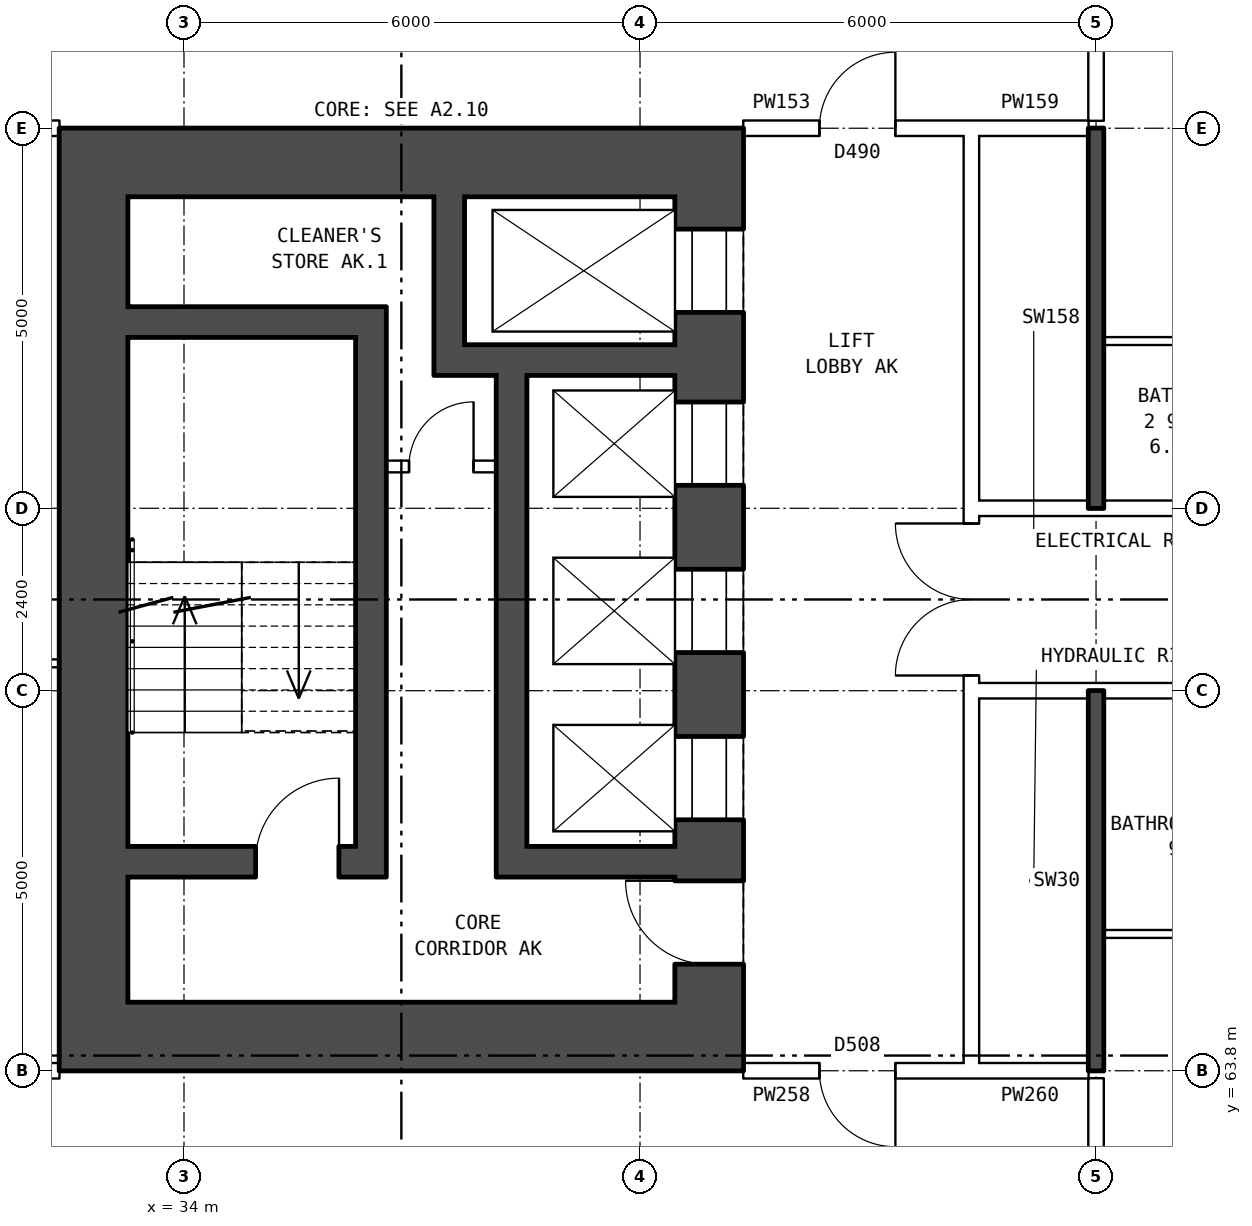
"""IFC4 building model, lengths in metres.
Left out: names, types, materials, properties, quantities, classifications, styles, units other than length and angle.
Written with IfcOpenShell. Run it as: python <this file> out.ifc"""

import sys

from ifc_helpers import new_model, si_unit, direction, frame, frame_2d, origin, place, context, subcontext, project, spatial, rectangle, extrude, element, fill, save


model = new_model("IFC4")
c1 = context("Model", 3, precision=1e-05, world=origin(), true_north=direction((0.0, 1.0)))
c2 = subcontext(c1, "Body", "Model", "MODEL_VIEW")
j1 = project(units=[si_unit("LENGTHUNIT", "METRE"), si_unit("PLANEANGLEUNIT", "RADIAN")], contexts=[c1])
p1 = place(None, origin())
s1 = spatial("IfcSite", under=j1, at=p1, CompositionType="ELEMENT")
p2 = place(p1, origin())
s2 = spatial("IfcBuilding", under=s1, at=p2, CompositionType="ELEMENT")
p3 = place(p2, frame((0.0, 0.0, 35.0)))
s3 = spatial("IfcBuildingStorey", under=s2, at=p3, CompositionType="ELEMENT", Elevation=35.0)
p4 = place(p3, frame((40.91, 75.3, 0.0), z_axis=(0.0, 0.0, 1.0), x_axis=(0.0, -1.0, 0.0)))
e1 = element("IfcWall", 1, at=p4, inside=s3, PredefinedType="SHEAR", context=c2, shape_type="SweptSolid", body=[
    extrude(rectangle(XDim=10.6, YDim=0.9, at=frame_2d((5.3, 0.0))), origin(), (0.0, 0.0, 1.0), 2.85),
])
p5 = place(p4, frame((0.425, 0.0, 0.0)))
e2 = element("IfcOpeningElement", 2, at=p5, cuts=e1, PredefinedType="OPENING", context=c2, shape_type="SweptSolid", body=[
    extrude(rectangle(XDim=1.1, YDim=2.1, at=frame_2d((0.55, 1.05))), frame((0.0, 0.46, 0.0), z_axis=(0.0, -1.0, 0.0), x_axis=(1.0, 0.0, 0.0)), (0.0, 0.0, 1.0), 0.92),
])
p6 = place(p4, frame((2.7, 0.0, 0.0)))
e3 = element("IfcOpeningElement", 3, at=p6, cuts=e1, PredefinedType="OPENING", context=c2, shape_type="SweptSolid", body=[
    extrude(rectangle(XDim=1.1, YDim=2.1, at=frame_2d((0.55, 1.05))), frame((0.0, 0.46, 0.0), z_axis=(0.0, -1.0, 0.0), x_axis=(1.0, 0.0, 0.0)), (0.0, 0.0, 1.0), 0.92),
])
p7 = place(p4, frame((4.9, 0.0, 0.0)))
e4 = element("IfcOpeningElement", 4, at=p7, cuts=e1, PredefinedType="OPENING", context=c2, shape_type="SweptSolid", body=[
    extrude(rectangle(XDim=1.1, YDim=2.1, at=frame_2d((0.55, 1.05))), frame((0.0, 0.46, 0.0), z_axis=(0.0, -1.0, 0.0), x_axis=(1.0, 0.0, 0.0)), (0.0, 0.0, 1.0), 0.92),
])
p8 = place(p4, frame((7.1, 0.0, 0.0)))
e5 = element("IfcOpeningElement", 5, at=p8, cuts=e1, PredefinedType="OPENING", context=c2, shape_type="SweptSolid", body=[
    extrude(rectangle(XDim=1.1, YDim=2.1, at=frame_2d((0.55, 1.05))), frame((0.0, 0.46, 0.0), z_axis=(0.0, -1.0, 0.0), x_axis=(1.0, 0.0, 0.0)), (0.0, 0.0, 1.0), 0.92),
])
p9 = place(p4, frame((9.0, 0.0, 0.0)))
e6 = element("IfcOpeningElement", 6, at=p9, cuts=e1, PredefinedType="OPENING", context=c2, shape_type="SweptSolid", body=[
    extrude(rectangle(XDim=1.1, YDim=2.1, at=frame_2d((0.55, 1.05))), frame((0.0, 0.46, 0.0), z_axis=(0.0, -1.0, 0.0), x_axis=(1.0, 0.0, 0.0)), (0.0, 0.0, 1.0), 0.92),
])
p10 = place(p3, frame((32.81, 75.3, 0.0), z_axis=(0.0, 0.0, 1.0), x_axis=(0.0, -1.0, 0.0)))
e7 = element("IfcWall", 7, at=p10, inside=s3, PredefinedType="SHEAR", context=c2, shape_type="SweptSolid", body=[
    extrude(rectangle(XDim=10.6, YDim=0.9, at=frame_2d((5.3, 0.0))), origin(), (0.0, 0.0, 1.0), 2.85),
])
for number, where, z_axis, x_axis in (
    (8, (41.36, 75.75, 0.0), (0.0, 0.0, 1.0), (-1.0, 0.0, 0.0)),
    (9, (41.36, 64.25, 0.0), (0.0, 0.0, 1.0), (-1.0, 0.0, 0.0)),
):
    element("IfcWall", number, at=place(p3, frame(where, z_axis=z_axis, x_axis=x_axis)), inside=s3, PredefinedType="SHEAR", context=c2, shape_type="SweptSolid", body=[
        extrude(rectangle(XDim=9.0, YDim=0.9, at=frame_2d((4.5, 0.0))), origin(), (0.0, 0.0, 1.0), 2.85),
    ])
p11 = place(p3, frame((36.26, 73.65, 0.0), z_axis=(0.0, 0.0, 1.0), x_axis=(-1.0, 0.0, 0.0)))
e10 = element("IfcWall", 10, at=p11, inside=s3, PredefinedType="SHEAR", context=c2, shape_type="SweptSolid", body=[
    extrude(rectangle(XDim=3.0, YDim=0.4, at=frame_2d((1.5, 0.0))), origin(), (0.0, 0.0, 1.0), 2.85),
])
p12 = place(p3, frame((40.46, 73.15, 0.0), z_axis=(0.0, 0.0, 1.0), x_axis=(-1.0, 0.0, 0.0)))
e11 = element("IfcWall", 11, at=p12, inside=s3, PredefinedType="SHEAR", context=c2, shape_type="SweptSolid", body=[
    extrude(rectangle(XDim=3.17, YDim=0.4, at=frame_2d((1.585, 0.0))), origin(), (0.0, 0.0, 1.0), 2.85),
])
p13 = place(p3, frame((38.11, 71.75, 0.0), z_axis=(0.0, 0.0, 1.0), x_axis=(-1.0, 0.0, 0.0)))
e12 = element("IfcWall", 12, at=p13, inside=s3, PredefinedType="PARTITIONING", context=c2, shape_type="SweptSolid", body=[
    extrude(rectangle(XDim=1.45, YDim=0.15, at=frame_2d((0.725, 0.0))), origin(), (0.0, 0.0, 1.0), 2.85),
])
p14 = place(p13, frame((0.3, 0.0, 0.0)))
e13 = element("IfcOpeningElement", 13, at=p14, cuts=e12, PredefinedType="OPENING", context=c2, shape_type="SweptSolid", body=[
    extrude(rectangle(XDim=0.85, YDim=2.1, at=frame_2d((0.425, 1.05))), frame((0.0, 0.085, 0.0), z_axis=(0.0, -1.0, 0.0), x_axis=(1.0, 0.0, 0.0)), (0.0, 0.0, 1.0), 0.17),
])
p15 = place(p3, frame((40.46, 66.55, 0.0), z_axis=(0.0, 0.0, 1.0), x_axis=(-1.0, 0.0, 0.0)))
e14 = element("IfcWall", 14, at=p15, inside=s3, PredefinedType="SHEAR", context=c2, shape_type="SweptSolid", body=[
    extrude(rectangle(XDim=1.95, YDim=0.4, at=frame_2d((0.975, 0.0))), origin(), (0.0, 0.0, 1.0), 2.85),
])
p16 = place(p3, frame((36.26, 66.55, 0.0), z_axis=(0.0, 0.0, 1.0), x_axis=(-1.0, 0.0, 0.0)))
e15 = element("IfcWall", 15, at=p16, inside=s3, PredefinedType="SHEAR", context=c2, shape_type="SweptSolid", body=[
    extrude(rectangle(XDim=3.0, YDim=0.4, at=frame_2d((1.5, 0.0))), origin(), (0.0, 0.0, 1.0), 2.85),
])
p17 = place(p16, frame((0.22, 0.0, 0.0)))
e16 = element("IfcOpeningElement", 16, at=p17, cuts=e15, PredefinedType="OPENING", context=c2, shape_type="SweptSolid", body=[
    extrude(rectangle(XDim=1.1, YDim=2.1, at=frame_2d((0.55, 1.05))), frame((0.0, 0.21, 0.0), z_axis=(0.0, -1.0, 0.0), x_axis=(1.0, 0.0, 0.0)), (0.0, 0.0, 1.0), 0.42),
])
p18 = place(p3, frame((38.31, 72.95, 0.0), z_axis=(0.0, 0.0, 1.0), x_axis=(0.0, -1.0, 0.0)))
e17 = element("IfcWall", 17, at=p18, inside=s3, PredefinedType="SHEAR", context=c2, shape_type="SweptSolid", body=[
    extrude(rectangle(XDim=6.6, YDim=0.4, at=frame_2d((3.3, 0.0))), origin(), (0.0, 0.0, 1.0), 2.85),
])
p19 = place(p3, frame((37.49, 75.3, 0.0), z_axis=(0.0, 0.0, 1.0), x_axis=(0.0, -1.0, 0.0)))
e18 = element("IfcWall", 18, at=p19, inside=s3, PredefinedType="SHEAR", context=c2, shape_type="SweptSolid", body=[
    extrude(rectangle(XDim=1.95, YDim=0.4, at=frame_2d((0.975, 0.0))), origin(), (0.0, 0.0, 1.0), 2.85),
])
p20 = place(p3, frame((36.46, 73.85, 0.0), z_axis=(0.0, 0.0, 1.0), x_axis=(0.0, -1.0, 0.0)))
e19 = element("IfcWall", 19, at=p20, inside=s3, PredefinedType="SHEAR", context=c2, shape_type="SweptSolid", body=[
    extrude(rectangle(XDim=7.5, YDim=0.4, at=frame_2d((3.75, 0.0))), origin(), (0.0, 0.0, 1.0), 2.85),
])
p21 = place(p3, frame((44.36, 63.9, 0.0), z_axis=(0.0, 0.0, 1.0), x_axis=(0.0, 1.0, 0.0)))
e20 = element("IfcWall", 20, at=p21, inside=s3, PredefinedType="PARTITIONING", context=c2, shape_type="SweptSolid", body=[
    extrude(rectangle(XDim=12.2, YDim=0.2, at=frame_2d((6.1, 0.0))), origin(), (0.0, 0.0, 1.0), 2.85),
])
p22 = place(p21, frame((5.1, 0.0, 0.0)))
e21 = element("IfcOpeningElement", 21, at=p22, cuts=e20, PredefinedType="OPENING", context=c2, shape_type="SweptSolid", body=[
    extrude(rectangle(XDim=2.0, YDim=2.1, at=frame_2d((1.0, 1.05))), frame((0.0, 0.11, 0.0), z_axis=(0.0, -1.0, 0.0), x_axis=(1.0, 0.0, 0.0)), (0.0, 0.0, 1.0), 0.22),
])
p23 = place(p3, frame((22.51, 63.8, 0.0), z_axis=(0.0, 0.0, 1.0), x_axis=(1.0, 0.0, 0.0)))
e22 = element("IfcWall", 22, at=p23, inside=s3, PredefinedType="PARTITIONING", context=c2, shape_type="SweptSolid", body=[
    extrude(rectangle(XDim=9.85, YDim=0.2, at=frame_2d((4.925, 0.0))), origin(), (0.0, 0.0, 1.0), 2.85),
])
p24 = place(p23, frame((7.27, 0.0, 0.0)))
e23 = element("IfcOpeningElement", 23, at=p24, cuts=e22, PredefinedType="OPENING", context=c2, shape_type="SweptSolid", body=[
    extrude(rectangle(XDim=0.8, YDim=2.1, at=frame_2d((0.4, 1.05))), frame((0.0, 0.11, 0.0), z_axis=(0.0, -1.0, 0.0), x_axis=(1.0, 0.0, 0.0)), (0.0, 0.0, 1.0), 0.22),
])
p25 = place(p3, frame((41.36, 63.8, 0.0), z_axis=(0.0, 0.0, 1.0), x_axis=(1.0, 0.0, 0.0)))
e24 = element("IfcWall", 24, at=p25, inside=s3, PredefinedType="PARTITIONING", context=c2, shape_type="SweptSolid", body=[
    extrude(rectangle(XDim=3.0, YDim=0.2, at=frame_2d((1.5, 0.0))), origin(), (0.0, 0.0, 1.0), 2.85),
])
p26 = place(p25, frame((1.0, 0.0, 0.0)))
e25 = element("IfcOpeningElement", 25, at=p26, cuts=e24, PredefinedType="OPENING", context=c2, shape_type="SweptSolid", body=[
    extrude(rectangle(XDim=1.0, YDim=2.1, at=frame_2d((0.5, 1.05))), frame((0.0, 0.11, 0.0), z_axis=(0.0, -1.0, 0.0), x_axis=(1.0, 0.0, 0.0)), (0.0, 0.0, 1.0), 0.22),
])
p27 = place(p3, frame((44.36, 63.8, 0.0), z_axis=(0.0, 0.0, 1.0), x_axis=(1.0, 0.0, 0.0)))
e26 = element("IfcWall", 26, at=p27, inside=s3, PredefinedType="PARTITIONING", context=c2, shape_type="SweptSolid", body=[
    extrude(rectangle(XDim=1.54, YDim=0.2, at=frame_2d((0.77, 0.0))), origin(), (0.0, 0.0, 1.0), 2.85),
])
p28 = place(p3, frame((46.1, 65.6, 0.0), z_axis=(0.0, 0.0, 1.0), x_axis=(1.0, 0.0, 0.0)))
e27 = element("IfcWall", 27, at=p28, inside=s3, PredefinedType="PARTITIONING", context=c2, shape_type="SweptSolid", body=[
    extrude(rectangle(XDim=2.9, YDim=0.1, at=frame_2d((1.45, 0.0))), origin(), (0.0, 0.0, 1.0), 2.85),
])
p29 = place(p3, frame((44.36, 68.8, 0.0), z_axis=(0.0, 0.0, 1.0), x_axis=(1.0, 0.0, 0.0)))
e28 = element("IfcWall", 28, at=p29, inside=s3, PredefinedType="PARTITIONING", context=c2, shape_type="SweptSolid", body=[
    extrude(rectangle(XDim=19.28, YDim=0.2, at=frame_2d((9.64, 0.0))), origin(), (0.0, 0.0, 1.0), 2.85),
])
p30 = place(p29, frame((14.64, 0.0, 0.0)))
e29 = element("IfcOpeningElement", 29, at=p30, cuts=e28, PredefinedType="OPENING", context=c2, shape_type="SweptSolid", body=[
    extrude(rectangle(XDim=1.0, YDim=2.1, at=frame_2d((0.5, 1.05))), frame((0.0, 0.11, 0.0), z_axis=(0.0, -1.0, 0.0), x_axis=(1.0, 0.0, 0.0)), (0.0, 0.0, 1.0), 0.22),
])
p31 = place(p29, frame((5.64, 0.0, 0.0)))
e30 = element("IfcOpeningElement", 30, at=p31, cuts=e28, PredefinedType="OPENING", context=c2, shape_type="SweptSolid", body=[
    extrude(rectangle(XDim=1.0, YDim=2.1, at=frame_2d((0.5, 1.05))), frame((0.0, 0.11, 0.0), z_axis=(0.0, -1.0, 0.0), x_axis=(1.0, 0.0, 0.0)), (0.0, 0.0, 1.0), 0.22),
])
p32 = place(p3, frame((28.1, 69.16, 0.0), z_axis=(0.0, 0.0, 1.0), x_axis=(1.0, 0.0, 0.0)))
e31 = element("IfcWall", 31, at=p32, inside=s3, PredefinedType="PARTITIONING", context=c2, shape_type="SweptSolid", body=[
    extrude(rectangle(XDim=4.26, YDim=0.1, at=frame_2d((2.13, 0.0))), origin(), (0.0, 0.0, 1.0), 2.85),
])
p33 = place(p3, frame((44.36, 71.2, 0.0), z_axis=(0.0, 0.0, 1.0), x_axis=(1.0, 0.0, 0.0)))
e32 = element("IfcWall", 32, at=p33, inside=s3, PredefinedType="PARTITIONING", context=c2, shape_type="SweptSolid", body=[
    extrude(rectangle(XDim=19.28, YDim=0.2, at=frame_2d((9.64, 0.0))), origin(), (0.0, 0.0, 1.0), 2.85),
])
p34 = place(p33, frame((14.64, 0.0, 0.0)))
e33 = element("IfcOpeningElement", 33, at=p34, cuts=e32, PredefinedType="OPENING", context=c2, shape_type="SweptSolid", body=[
    extrude(rectangle(XDim=1.0, YDim=2.1, at=frame_2d((0.5, 1.05))), frame((0.0, 0.11, 0.0), z_axis=(0.0, -1.0, 0.0), x_axis=(1.0, 0.0, 0.0)), (0.0, 0.0, 1.0), 0.22),
])
p35 = place(p33, frame((5.64, 0.0, 0.0)))
e34 = element("IfcOpeningElement", 34, at=p35, cuts=e32, PredefinedType="OPENING", context=c2, shape_type="SweptSolid", body=[
    extrude(rectangle(XDim=1.0, YDim=2.1, at=frame_2d((0.5, 1.05))), frame((0.0, 0.11, 0.0), z_axis=(0.0, -1.0, 0.0), x_axis=(1.0, 0.0, 0.0)), (0.0, 0.0, 1.0), 0.22),
])
p36 = place(p3, frame((46.1, 73.4, 0.0), z_axis=(0.0, 0.0, 1.0), x_axis=(1.0, 0.0, 0.0)))
e35 = element("IfcWall", 35, at=p36, inside=s3, PredefinedType="PARTITIONING", context=c2, shape_type="SweptSolid", body=[
    extrude(rectangle(XDim=2.9, YDim=0.1, at=frame_2d((1.45, 0.0))), origin(), (0.0, 0.0, 1.0), 2.85),
])
p37 = place(p3, frame((22.51, 76.2, 0.0), z_axis=(0.0, 0.0, 1.0), x_axis=(1.0, 0.0, 0.0)))
e36 = element("IfcWall", 36, at=p37, inside=s3, PredefinedType="PARTITIONING", context=c2, shape_type="SweptSolid", body=[
    extrude(rectangle(XDim=9.85, YDim=0.2, at=frame_2d((4.925, 0.0))), origin(), (0.0, 0.0, 1.0), 2.85),
])
p38 = place(p37, frame((7.27, 0.0, 0.0)))
e37 = element("IfcOpeningElement", 37, at=p38, cuts=e36, PredefinedType="OPENING", context=c2, shape_type="SweptSolid", body=[
    extrude(rectangle(XDim=0.8, YDim=2.1, at=frame_2d((0.4, 1.05))), frame((0.0, 0.11, 0.0), z_axis=(0.0, -1.0, 0.0), x_axis=(1.0, 0.0, 0.0)), (0.0, 0.0, 1.0), 0.22),
])
p39 = place(p3, frame((41.36, 76.2, 0.0), z_axis=(0.0, 0.0, 1.0), x_axis=(1.0, 0.0, 0.0)))
e38 = element("IfcWall", 38, at=p39, inside=s3, PredefinedType="PARTITIONING", context=c2, shape_type="SweptSolid", body=[
    extrude(rectangle(XDim=3.0, YDim=0.2, at=frame_2d((1.5, 0.0))), origin(), (0.0, 0.0, 1.0), 2.85),
])
p40 = place(p39, frame((1.0, 0.0, 0.0)))
e39 = element("IfcOpeningElement", 39, at=p40, cuts=e38, PredefinedType="OPENING", context=c2, shape_type="SweptSolid", body=[
    extrude(rectangle(XDim=1.0, YDim=2.1, at=frame_2d((0.5, 1.05))), frame((0.0, 0.11, 0.0), z_axis=(0.0, -1.0, 0.0), x_axis=(1.0, 0.0, 0.0)), (0.0, 0.0, 1.0), 0.22),
])
p41 = place(p3, frame((44.36, 76.2, 0.0), z_axis=(0.0, 0.0, 1.0), x_axis=(1.0, 0.0, 0.0)))
e40 = element("IfcWall", 40, at=p41, inside=s3, PredefinedType="PARTITIONING", context=c2, shape_type="SweptSolid", body=[
    extrude(rectangle(XDim=1.54, YDim=0.2, at=frame_2d((0.77, 0.0))), origin(), (0.0, 0.0, 1.0), 2.85),
])
p42 = place(p3, frame((46.0, 61.5, 0.0), z_axis=(0.0, 0.0, 1.0), x_axis=(0.0, 1.0, 0.0)))
e41 = element("IfcWall", 41, at=p42, inside=s3, PredefinedType="PARTITIONING", context=c2, shape_type="SweptSolid", body=[
    extrude(rectangle(XDim=2.2, YDim=0.2, at=frame_2d((1.1, 0.0))), origin(), (0.0, 0.0, 1.0), 2.85),
])
for number, where, z_axis, x_axis in (
    (42, (46.0, 63.8, 0.0), (0.0, 0.0, 1.0), (0.0, 1.0, 0.0)),
    (43, (46.0, 71.2, 0.0), (0.0, 0.0, 1.0), (0.0, 1.0, 0.0)),
):
    element("IfcWall", number, at=place(p3, frame(where, z_axis=z_axis, x_axis=x_axis)), inside=s3, PredefinedType="SOLIDWALL", context=c2, shape_type="SweptSolid", body=[
        extrude(rectangle(XDim=5.0, YDim=0.2, at=frame_2d((2.5, 0.0))), origin(), (0.0, 0.0, 1.0), 2.85),
    ])
p43 = place(p3, frame((46.0, 76.3, 0.0), z_axis=(0.0, 0.0, 1.0), x_axis=(0.0, 1.0, 0.0)))
e44 = element("IfcWall", 44, at=p43, inside=s3, PredefinedType="PARTITIONING", context=c2, shape_type="SweptSolid", body=[
    extrude(rectangle(XDim=2.2, YDim=0.2, at=frame_2d((1.1, 0.0))), origin(), (0.0, 0.0, 1.0), 2.85),
])
p44 = place(p5, origin())
e45 = element("IfcDoor", 45, at=p44, inside=s3, OperationType="DOUBLE_DOOR_SLIDING", PredefinedType="DOOR", context=c2, shape_type="SweptSolid", body=[
    extrude(rectangle(XDim=1.1, YDim=2.1, at=frame_2d((0.55, 1.05))), frame((0.0, -0.385, 0.0), z_axis=(0.0, -1.0, 0.0), x_axis=(1.0, 0.0, 0.0)), (0.0, 0.0, 1.0), 0.05),
])
fill(e2, e45)
p45 = place(p6, origin())
e46 = element("IfcDoor", 46, at=p45, inside=s3, OperationType="DOUBLE_DOOR_SLIDING", PredefinedType="DOOR", context=c2, shape_type="SweptSolid", body=[
    extrude(rectangle(XDim=1.1, YDim=2.1, at=frame_2d((0.55, 1.05))), frame((0.0, -0.385, 0.0), z_axis=(0.0, -1.0, 0.0), x_axis=(1.0, 0.0, 0.0)), (0.0, 0.0, 1.0), 0.05),
])
fill(e3, e46)
p46 = place(p7, origin())
e47 = element("IfcDoor", 47, at=p46, inside=s3, OperationType="DOUBLE_DOOR_SLIDING", PredefinedType="DOOR", context=c2, shape_type="SweptSolid", body=[
    extrude(rectangle(XDim=1.1, YDim=2.1, at=frame_2d((0.55, 1.05))), frame((0.0, -0.385, 0.0), z_axis=(0.0, -1.0, 0.0), x_axis=(1.0, 0.0, 0.0)), (0.0, 0.0, 1.0), 0.05),
])
fill(e4, e47)
p47 = place(p8, origin())
e48 = element("IfcDoor", 48, at=p47, inside=s3, OperationType="DOUBLE_DOOR_SLIDING", PredefinedType="DOOR", context=c2, shape_type="SweptSolid", body=[
    extrude(rectangle(XDim=1.1, YDim=2.1, at=frame_2d((0.55, 1.05))), frame((0.0, -0.385, 0.0), z_axis=(0.0, -1.0, 0.0), x_axis=(1.0, 0.0, 0.0)), (0.0, 0.0, 1.0), 0.05),
])
fill(e5, e48)
p48 = place(p9, frame((1.1, 0.0, 0.0), z_axis=(0.0, 0.0, 1.0), x_axis=(-1.0, 0.0, 0.0)))
e49 = element("IfcDoor", 49, at=p48, inside=s3, OperationType="SINGLE_SWING_RIGHT", PredefinedType="DOOR", context=c2, shape_type="SweptSolid", body=[
    extrude(rectangle(XDim=1.1, YDim=2.1, at=frame_2d((0.55, 1.05))), frame((0.0, 0.435, 0.0), z_axis=(0.0, -1.0, 0.0), x_axis=(1.0, 0.0, 0.0)), (0.0, 0.0, 1.0), 0.05),
])
fill(e6, e49)
p49 = place(p17, frame((1.1, 0.0, 0.0), z_axis=(0.0, 0.0, 1.0), x_axis=(-1.0, 0.0, 0.0)))
e50 = element("IfcDoor", 50, at=p49, inside=s3, OperationType="SINGLE_SWING_RIGHT", PredefinedType="DOOR", context=c2, shape_type="SweptSolid", body=[
    extrude(rectangle(XDim=1.1, YDim=2.1, at=frame_2d((0.55, 1.05))), frame((0.0, 0.025, 0.0), z_axis=(0.0, -1.0, 0.0), x_axis=(1.0, 0.0, 0.0)), (0.0, 0.0, 1.0), 0.05),
])
fill(e16, e50)
p50 = place(p14, frame((0.85, 0.0, 0.0), z_axis=(0.0, 0.0, 1.0), x_axis=(-1.0, 0.0, 0.0)))
e51 = element("IfcDoor", 51, at=p50, inside=s3, OperationType="SINGLE_SWING_RIGHT", PredefinedType="DOOR", context=c2, shape_type="SweptSolid", body=[
    extrude(rectangle(XDim=0.85, YDim=2.1, at=frame_2d((0.425, 1.05))), frame((0.0, 0.025, 0.0), z_axis=(0.0, -1.0, 0.0), x_axis=(1.0, 0.0, 0.0)), (0.0, 0.0, 1.0), 0.05),
])
fill(e13, e51)
p51 = place(p22, origin())
e52 = element("IfcDoor", 52, at=p51, inside=s3, OperationType="DOUBLE_DOOR_SINGLE_SWING", PredefinedType="DOOR", context=c2, shape_type="SweptSolid", body=[
    extrude(rectangle(XDim=2.0, YDim=2.1, at=frame_2d((1.0, 1.05))), frame((0.0, 0.025, 0.0), z_axis=(0.0, -1.0, 0.0), x_axis=(1.0, 0.0, 0.0)), (0.0, 0.0, 1.0), 0.05),
])
fill(e21, e52)
p52 = place(p26, frame((1.0, 0.0, 0.0), z_axis=(0.0, 0.0, 1.0), x_axis=(-1.0, 0.0, 0.0)))
e53 = element("IfcDoor", 53, at=p52, inside=s3, OperationType="SINGLE_SWING_LEFT", PredefinedType="DOOR", context=c2, shape_type="SweptSolid", body=[
    extrude(rectangle(XDim=1.0, YDim=2.1, at=frame_2d((0.5, 1.05))), frame((0.0, 0.025, 0.0), z_axis=(0.0, -1.0, 0.0), x_axis=(1.0, 0.0, 0.0)), (0.0, 0.0, 1.0), 0.05),
])
fill(e25, e53)
p53 = place(p40, origin())
e54 = element("IfcDoor", 54, at=p53, inside=s3, OperationType="SINGLE_SWING_RIGHT", PredefinedType="DOOR", context=c2, shape_type="SweptSolid", body=[
    extrude(rectangle(XDim=1.0, YDim=2.1, at=frame_2d((0.5, 1.05))), frame((0.0, 0.025, 0.0), z_axis=(0.0, -1.0, 0.0), x_axis=(1.0, 0.0, 0.0)), (0.0, 0.0, 1.0), 0.05),
])
fill(e39, e54)
save(model, sys.argv[1])
